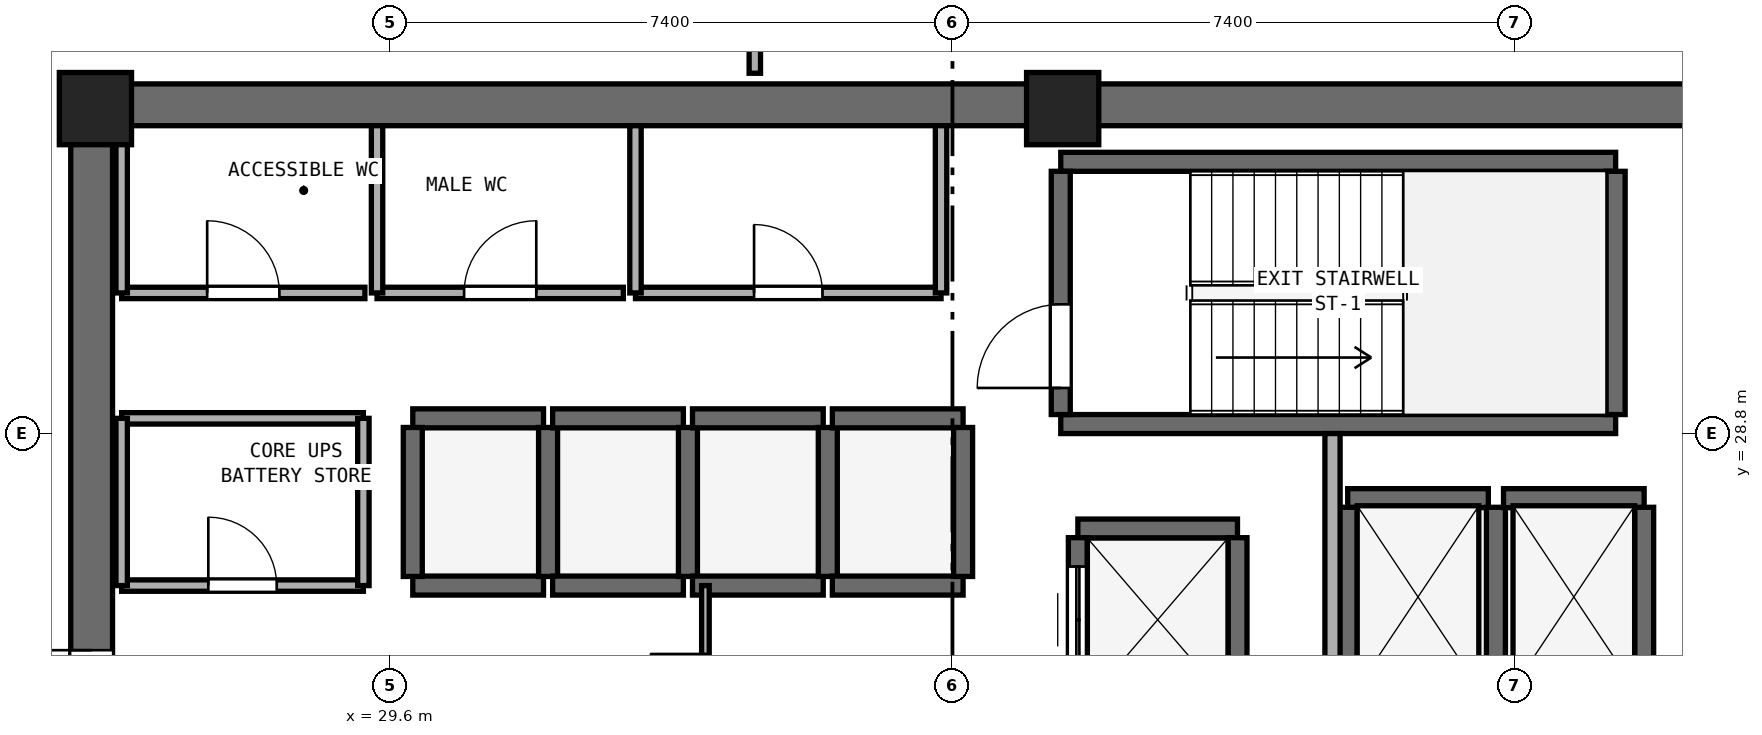
"""IFC4 building model, lengths in metres.
Left out: names, types, materials, properties, quantities, classifications, styles, units other than length and angle.
Written with IfcOpenShell. Run it as: python <this file> out.ifc"""

import sys

from ifc_helpers import new_model, si_unit, direction, frame, frame_2d, origin, origin_2d, place, context, subcontext, project, spatial, rectangle, extrude, element, fill, save


model = new_model("IFC4")
c1 = context("Model", 3, precision=1e-05, world=origin(), true_north=direction((0.0, 1.0)))
c2 = subcontext(c1, "Body", "Model", "MODEL_VIEW")
j1 = project(units=[si_unit("LENGTHUNIT", "METRE"), si_unit("PLANEANGLEUNIT", "RADIAN")], contexts=[c1])
p1 = place(None, origin())
s1 = spatial("IfcSite", under=j1, at=p1, CompositionType="ELEMENT")
p2 = place(p1, origin())
s2 = spatial("IfcBuilding", under=s1, at=p2, CompositionType="ELEMENT")
p3 = place(p2, frame((0.0, 0.0, 174.4)))
s3 = spatial("IfcBuildingStorey", under=s2, at=p3, CompositionType="ELEMENT", Elevation=174.4)
p4 = place(p3, frame((25.4, 33.125, 0.0), z_axis=(0.0, 0.0, 1.0), x_axis=(1.0, 0.0, 0.0)))
e1 = element("IfcWall", 1, at=p4, inside=s3, PredefinedType="SHEAR", context=c2, shape_type="SweptSolid", body=[
    extrude(rectangle(XDim=23.2, YDim=0.55, at=frame_2d((11.6, 0.0))), origin(), (0.0, 0.0, 1.0), 3.54),
])
p5 = place(p3, frame((25.675, 17.55, 0.0), z_axis=(0.0, 0.0, 1.0), x_axis=(0.0, 1.0, 0.0)))
e2 = element("IfcWall", 2, at=p5, inside=s3, PredefinedType="SHEAR", context=c2, shape_type="SweptSolid", body=[
    extrude(rectangle(XDim=15.3, YDim=0.55, at=frame_2d((7.65, 0.0))), origin(), (0.0, 0.0, 1.0), 3.54),
])
p6 = place(p5, frame((6.9, 0.0, 0.0)))
e3 = element("IfcOpeningElement", 3, at=p6, cuts=e2, PredefinedType="OPENING", context=c2, shape_type="SweptSolid", body=[
    extrude(rectangle(XDim=1.5, YDim=2.15, at=frame_2d((0.75, 1.075))), frame((0.0, 0.285, 0.0), z_axis=(0.0, -1.0, 0.0), x_axis=(1.0, 0.0, 0.0)), (0.0, 0.0, 1.0), 0.57),
])
for number, where, z_axis, x_axis in (
    (4, (38.45, 33.075, 0.0), (0.0, 0.0, 1.0), (1.0, 0.0, 0.0)),
    (5, (25.725, 33.075, 0.0), (0.0, 0.0, 1.0), (1.0, 0.0, 0.0)),
):
    element("IfcColumn", number, at=place(p3, frame(where, z_axis=z_axis, x_axis=x_axis)), inside=s3, PredefinedType="PILASTER", context=c2, shape_type="SweptSolid", body=[
        extrude(rectangle(XDim=0.95, YDim=0.95, at=origin_2d()), origin(), (0.0, 0.0, 1.0), 3.8),
    ])
for number, where, z_axis, x_axis in (
    (6, (38.425, 28.925, 0.0), (0.0, 0.0, 1.0), (1.0, 0.0, 0.0)),
    (7, (38.425, 32.375, 0.0), (0.0, 0.0, 1.0), (1.0, 0.0, 0.0)),
):
    element("IfcWall", number, at=place(p3, frame(where, z_axis=z_axis, x_axis=x_axis)), inside=s3, PredefinedType="SHEAR", context=c2, shape_type="SweptSolid", body=[
        extrude(rectangle(XDim=7.3, YDim=0.25, at=frame_2d((3.65, 0.0))), origin(), (0.0, 0.0, 1.0), 3.54),
    ])
p7 = place(p3, frame((38.425, 29.05, 0.0), z_axis=(0.0, 0.0, 1.0), x_axis=(0.0, 1.0, 0.0)))
e8 = element("IfcWall", 8, at=p7, inside=s3, PredefinedType="SHEAR", context=c2, shape_type="SweptSolid", body=[
    extrude(rectangle(XDim=3.2, YDim=0.25, at=frame_2d((1.6, 0.0))), origin(), (0.0, 0.0, 1.0), 3.54),
])
p8 = place(p7, frame((0.35, 0.0, 0.0)))
e9 = element("IfcOpeningElement", 9, at=p8, cuts=e8, PredefinedType="OPENING", context=c2, shape_type="SweptSolid", body=[
    extrude(rectangle(XDim=1.1, YDim=2.15, at=frame_2d((0.55, 1.075))), frame((0.0, 0.135, 0.0), z_axis=(0.0, -1.0, 0.0), x_axis=(1.0, 0.0, 0.0)), (0.0, 0.0, 1.0), 0.27),
])
p9 = place(p3, frame((45.725, 29.05, 0.0), z_axis=(0.0, 0.0, 1.0), x_axis=(0.0, 1.0, 0.0)))
e10 = element("IfcWall", 10, at=p9, inside=s3, PredefinedType="SHEAR", context=c2, shape_type="SweptSolid", body=[
    extrude(rectangle(XDim=3.2, YDim=0.25, at=frame_2d((1.6, 0.0))), origin(), (0.0, 0.0, 1.0), 3.54),
])
for number, where, z_axis, x_axis in (
    (11, (29.9, 26.8, 0.0), (0.0, 0.0, 1.0), (1.0, 0.0, 0.0)),
    (12, (29.9, 29.0, 0.0), (0.0, 0.0, 1.0), (1.0, 0.0, 0.0)),
):
    element("IfcWall", number, at=place(p3, frame(where, z_axis=z_axis, x_axis=x_axis)), inside=s3, PredefinedType="SHEAR", context=c2, shape_type="SweptSolid", body=[
        extrude(rectangle(XDim=1.72, YDim=0.25, at=frame_2d((0.86, 0.0))), origin(), (0.0, 0.0, 1.0), 3.54),
    ])
for number, where, z_axis, x_axis in (
    (13, (29.9, 26.92, 0.0), (0.0, 0.0, 1.0), (0.0, 1.0, 0.0)),
    (14, (31.68, 26.92, 0.0), (0.0, 0.0, 1.0), (0.0, 1.0, 0.0)),
):
    element("IfcWall", number, at=place(p3, frame(where, z_axis=z_axis, x_axis=x_axis)), inside=s3, PredefinedType="SHEAR", context=c2, shape_type="SweptSolid", body=[
        extrude(rectangle(XDim=1.96, YDim=0.25, at=frame_2d((0.98, 0.0))), origin(), (0.0, 0.0, 1.0), 3.54),
    ])
for number, where, z_axis, x_axis in (
    (15, (31.74, 26.8, 0.0), (0.0, 0.0, 1.0), (1.0, 0.0, 0.0)),
    (16, (31.74, 29.0, 0.0), (0.0, 0.0, 1.0), (1.0, 0.0, 0.0)),
):
    element("IfcWall", number, at=place(p3, frame(where, z_axis=z_axis, x_axis=x_axis)), inside=s3, PredefinedType="SHEAR", context=c2, shape_type="SweptSolid", body=[
        extrude(rectangle(XDim=1.72, YDim=0.25, at=frame_2d((0.86, 0.0))), origin(), (0.0, 0.0, 1.0), 3.54),
    ])
p10 = place(p3, frame((33.52, 26.92, 0.0), z_axis=(0.0, 0.0, 1.0), x_axis=(0.0, 1.0, 0.0)))
e17 = element("IfcWall", 17, at=p10, inside=s3, PredefinedType="SHEAR", context=c2, shape_type="SweptSolid", body=[
    extrude(rectangle(XDim=1.96, YDim=0.25, at=frame_2d((0.98, 0.0))), origin(), (0.0, 0.0, 1.0), 3.54),
])
for number, where, z_axis, x_axis in (
    (18, (33.58, 26.8, 0.0), (0.0, 0.0, 1.0), (1.0, 0.0, 0.0)),
    (19, (33.58, 29.0, 0.0), (0.0, 0.0, 1.0), (1.0, 0.0, 0.0)),
):
    element("IfcWall", number, at=place(p3, frame(where, z_axis=z_axis, x_axis=x_axis)), inside=s3, PredefinedType="SHEAR", context=c2, shape_type="SweptSolid", body=[
        extrude(rectangle(XDim=1.72, YDim=0.25, at=frame_2d((0.86, 0.0))), origin(), (0.0, 0.0, 1.0), 3.54),
    ])
p11 = place(p3, frame((35.36, 26.92, 0.0), z_axis=(0.0, 0.0, 1.0), x_axis=(0.0, 1.0, 0.0)))
e20 = element("IfcWall", 20, at=p11, inside=s3, PredefinedType="SHEAR", context=c2, shape_type="SweptSolid", body=[
    extrude(rectangle(XDim=1.96, YDim=0.25, at=frame_2d((0.98, 0.0))), origin(), (0.0, 0.0, 1.0), 3.54),
])
for number, where, z_axis, x_axis in (
    (21, (35.42, 26.8, 0.0), (0.0, 0.0, 1.0), (1.0, 0.0, 0.0)),
    (22, (35.42, 29.0, 0.0), (0.0, 0.0, 1.0), (1.0, 0.0, 0.0)),
):
    element("IfcWall", number, at=place(p3, frame(where, z_axis=z_axis, x_axis=x_axis)), inside=s3, PredefinedType="SHEAR", context=c2, shape_type="SweptSolid", body=[
        extrude(rectangle(XDim=1.72, YDim=0.25, at=frame_2d((0.86, 0.0))), origin(), (0.0, 0.0, 1.0), 3.54),
    ])
p12 = place(p3, frame((37.14, 26.92, 0.0), z_axis=(0.0, 0.0, 1.0), x_axis=(0.0, 1.0, 0.0)))
e23 = element("IfcWall", 23, at=p12, inside=s3, PredefinedType="SHEAR", context=c2, shape_type="SweptSolid", body=[
    extrude(rectangle(XDim=1.96, YDim=0.25, at=frame_2d((0.98, 0.0))), origin(), (0.0, 0.0, 1.0), 3.54),
])
p13 = place(p3, frame((42.2, 27.95, 0.0), z_axis=(0.0, 0.0, 1.0), x_axis=(1.0, 0.0, 0.0)))
e24 = element("IfcWall", 24, at=p13, inside=s3, PredefinedType="SHEAR", context=c2, shape_type="SweptSolid", body=[
    extrude(rectangle(XDim=1.85, YDim=0.25, at=frame_2d((0.925, 0.0))), origin(), (0.0, 0.0, 1.0), 3.54),
])
for number, where, z_axis, x_axis in (
    (25, (42.2, 25.47, 0.0), (0.0, 0.0, 1.0), (0.0, 1.0, 0.0)),
    (26, (44.15, 25.47, 0.0), (0.0, 0.0, 1.0), (0.0, 1.0, 0.0)),
):
    element("IfcWall", number, at=place(p3, frame(where, z_axis=z_axis, x_axis=x_axis)), inside=s3, PredefinedType="SHEAR", context=c2, shape_type="SweptSolid", body=[
        extrude(rectangle(XDim=2.36, YDim=0.25, at=frame_2d((1.18, 0.0))), origin(), (0.0, 0.0, 1.0), 3.54),
    ])
p14 = place(p3, frame((44.25, 27.95, 0.0), z_axis=(0.0, 0.0, 1.0), x_axis=(1.0, 0.0, 0.0)))
e27 = element("IfcWall", 27, at=p14, inside=s3, PredefinedType="SHEAR", context=c2, shape_type="SweptSolid", body=[
    extrude(rectangle(XDim=1.85, YDim=0.25, at=frame_2d((0.925, 0.0))), origin(), (0.0, 0.0, 1.0), 3.54),
])
p15 = place(p3, frame((46.1, 25.47, 0.0), z_axis=(0.0, 0.0, 1.0), x_axis=(0.0, 1.0, 0.0)))
e28 = element("IfcWall", 28, at=p15, inside=s3, PredefinedType="SHEAR", context=c2, shape_type="SweptSolid", body=[
    extrude(rectangle(XDim=2.36, YDim=0.25, at=frame_2d((1.18, 0.0))), origin(), (0.0, 0.0, 1.0), 3.54),
])
p16 = place(p3, frame((38.65, 27.55, 0.0), z_axis=(0.0, 0.0, 1.0), x_axis=(1.0, 0.0, 0.0)))
e29 = element("IfcWall", 29, at=p16, inside=s3, PredefinedType="SHEAR", context=c2, shape_type="SweptSolid", body=[
    extrude(rectangle(XDim=2.1, YDim=0.25, at=frame_2d((1.05, 0.0))), origin(), (0.0, 0.0, 1.0), 3.54),
])
p17 = place(p3, frame((38.65, 25.27, 0.0), z_axis=(0.0, 0.0, 1.0), x_axis=(0.0, 1.0, 0.0)))
e30 = element("IfcWall", 30, at=p17, inside=s3, PredefinedType="SHEAR", context=c2, shape_type="SweptSolid", body=[
    extrude(rectangle(XDim=2.16, YDim=0.25, at=frame_2d((1.08, 0.0))), origin(), (0.0, 0.0, 1.0), 3.54),
])
p18 = place(p17, frame((0.38, 0.0, 0.0)))
e31 = element("IfcOpeningElement", 31, at=p18, cuts=e30, PredefinedType="OPENING", context=c2, shape_type="SweptSolid", body=[
    extrude(rectangle(XDim=1.4, YDim=2.2, at=frame_2d((0.7, 1.1))), frame((0.0, 0.135, 0.0), z_axis=(0.0, -1.0, 0.0), x_axis=(1.0, 0.0, 0.0)), (0.0, 0.0, 1.0), 0.27),
])
p19 = place(p3, frame((40.75, 25.27, 0.0), z_axis=(0.0, 0.0, 1.0), x_axis=(0.0, 1.0, 0.0)))
e32 = element("IfcWall", 32, at=p19, inside=s3, PredefinedType="SHEAR", context=c2, shape_type="SweptSolid", body=[
    extrude(rectangle(XDim=2.16, YDim=0.25, at=frame_2d((1.08, 0.0))), origin(), (0.0, 0.0, 1.0), 3.54),
])
p20 = place(p3, frame((42.0, 22.75, 0.0), z_axis=(0.0, 0.0, 1.0), x_axis=(0.0, 1.0, 0.0)))
e33 = element("IfcWall", 33, at=p20, inside=s3, PredefinedType="SOLIDWALL", context=c2, shape_type="SweptSolid", body=[
    extrude(rectangle(XDim=6.05, YDim=0.2, at=frame_2d((3.025, 0.0))), origin(), (0.0, 0.0, 1.0), 3.54),
])
p21 = place(p20, frame((0.65, 0.0, 0.0)))
e34 = element("IfcOpeningElement", 34, at=p21, cuts=e33, PredefinedType="OPENING", context=c2, shape_type="SweptSolid", body=[
    extrude(rectangle(XDim=1.2, YDim=2.15, at=frame_2d((0.6, 1.075))), frame((0.0, 0.11, 0.0), z_axis=(0.0, -1.0, 0.0), x_axis=(1.0, 0.0, 0.0)), (0.0, 0.0, 1.0), 0.22),
])
p22 = place(p3, frame((26.07, 30.65, 0.0), z_axis=(0.0, 0.0, 1.0), x_axis=(1.0, 0.0, 0.0)))
e35 = element("IfcWall", 35, at=p22, inside=s3, PredefinedType="PARTITIONING", context=c2, shape_type="SweptSolid", body=[
    extrude(rectangle(XDim=3.2, YDim=0.15, at=frame_2d((1.6, 0.0))), origin(), (0.0, 0.0, 1.0), 3.54),
])
p23 = place(p22, frame((1.125, 0.0, 0.0)))
e36 = element("IfcOpeningElement", 36, at=p23, cuts=e35, PredefinedType="OPENING", context=c2, shape_type="SweptSolid", body=[
    extrude(rectangle(XDim=0.95, YDim=2.1, at=frame_2d((0.475, 1.05))), frame((0.0, 0.085, 0.0), z_axis=(0.0, -1.0, 0.0), x_axis=(1.0, 0.0, 0.0)), (0.0, 0.0, 1.0), 0.17),
])
p24 = place(p3, frame((26.07, 30.65, 0.0), z_axis=(0.0, 0.0, 1.0), x_axis=(0.0, 1.0, 0.0)))
e37 = element("IfcWall", 37, at=p24, inside=s3, PredefinedType="PARTITIONING", context=c2, shape_type="SweptSolid", body=[
    extrude(rectangle(XDim=2.2, YDim=0.15, at=frame_2d((1.1, 0.0))), origin(), (0.0, 0.0, 1.0), 2.64),
])
p25 = place(p3, frame((29.43, 30.65, 0.0), z_axis=(0.0, 0.0, 1.0), x_axis=(1.0, 0.0, 0.0)))
e38 = element("IfcWall", 38, at=p25, inside=s3, PredefinedType="PARTITIONING", context=c2, shape_type="SweptSolid", body=[
    extrude(rectangle(XDim=3.24, YDim=0.15, at=frame_2d((1.62, 0.0))), origin(), (0.0, 0.0, 1.0), 3.54),
])
p26 = place(p25, frame((1.145, 0.0, 0.0)))
e39 = element("IfcOpeningElement", 39, at=p26, cuts=e38, PredefinedType="OPENING", context=c2, shape_type="SweptSolid", body=[
    extrude(rectangle(XDim=0.95, YDim=2.1, at=frame_2d((0.475, 1.05))), frame((0.0, 0.085, 0.0), z_axis=(0.0, -1.0, 0.0), x_axis=(1.0, 0.0, 0.0)), (0.0, 0.0, 1.0), 0.17),
])
p27 = place(p3, frame((29.43, 30.65, 0.0), z_axis=(0.0, 0.0, 1.0), x_axis=(0.0, 1.0, 0.0)))
e40 = element("IfcWall", 40, at=p27, inside=s3, PredefinedType="PARTITIONING", context=c2, shape_type="SweptSolid", body=[
    extrude(rectangle(XDim=2.2, YDim=0.15, at=frame_2d((1.1, 0.0))), origin(), (0.0, 0.0, 1.0), 3.54),
])
p28 = place(p3, frame((32.83, 30.65, 0.0), z_axis=(0.0, 0.0, 1.0), x_axis=(1.0, 0.0, 0.0)))
e41 = element("IfcWall", 41, at=p28, inside=s3, PredefinedType="PARTITIONING", context=c2, shape_type="SweptSolid", body=[
    extrude(rectangle(XDim=4.02, YDim=0.15, at=frame_2d((2.01, 0.0))), origin(), (0.0, 0.0, 1.0), 3.54),
])
p29 = place(p28, frame((1.56, 0.0, 0.0)))
e42 = element("IfcOpeningElement", 42, at=p29, cuts=e41, PredefinedType="OPENING", context=c2, shape_type="SweptSolid", body=[
    extrude(rectangle(XDim=0.9, YDim=2.1, at=frame_2d((0.45, 1.05))), frame((0.0, 0.085, 0.0), z_axis=(0.0, -1.0, 0.0), x_axis=(1.0, 0.0, 0.0)), (0.0, 0.0, 1.0), 0.17),
])
for number, where, z_axis, x_axis in (
    (43, (32.83, 30.65, 0.0), (0.0, 0.0, 1.0), (0.0, 1.0, 0.0)),
    (44, (36.85, 30.65, 0.0), (0.0, 0.0, 1.0), (0.0, 1.0, 0.0)),
):
    element("IfcWall", number, at=place(p3, frame(where, z_axis=z_axis, x_axis=x_axis)), inside=s3, PredefinedType="PARTITIONING", context=c2, shape_type="SweptSolid", body=[
        extrude(rectangle(XDim=2.2, YDim=0.15, at=frame_2d((1.1, 0.0))), origin(), (0.0, 0.0, 1.0), 3.54),
    ])
p30 = place(p3, frame((26.07, 26.8, 0.0), z_axis=(0.0, 0.0, 1.0), x_axis=(1.0, 0.0, 0.0)))
e45 = element("IfcWall", 45, at=p30, inside=s3, PredefinedType="PARTITIONING", context=c2, shape_type="SweptSolid", body=[
    extrude(rectangle(XDim=3.18, YDim=0.15, at=frame_2d((1.59, 0.0))), origin(), (0.0, 0.0, 1.0), 3.54),
])
p31 = place(p30, frame((1.14, 0.0, 0.0)))
e46 = element("IfcOpeningElement", 46, at=p31, cuts=e45, PredefinedType="OPENING", context=c2, shape_type="SweptSolid", body=[
    extrude(rectangle(XDim=0.9, YDim=2.1, at=frame_2d((0.45, 1.05))), frame((0.0, 0.085, 0.0), z_axis=(0.0, -1.0, 0.0), x_axis=(1.0, 0.0, 0.0)), (0.0, 0.0, 1.0), 0.17),
])
p32 = place(p3, frame((26.07, 29.0, 0.0), z_axis=(0.0, 0.0, 1.0), x_axis=(1.0, 0.0, 0.0)))
e47 = element("IfcWall", 47, at=p32, inside=s3, PredefinedType="PARTITIONING", context=c2, shape_type="SweptSolid", body=[
    extrude(rectangle(XDim=3.18, YDim=0.15, at=frame_2d((1.59, 0.0))), origin(), (0.0, 0.0, 1.0), 3.54),
])
p33 = place(p3, frame((26.07, 26.8, 0.0), z_axis=(0.0, 0.0, 1.0), x_axis=(0.0, 1.0, 0.0)))
e48 = element("IfcWall", 48, at=p33, inside=s3, PredefinedType="PARTITIONING", context=c2, shape_type="SweptSolid", body=[
    extrude(rectangle(XDim=2.2, YDim=0.15, at=frame_2d((1.1, 0.0))), origin(), (0.0, 0.0, 1.0), 2.64),
])
p34 = place(p3, frame((29.25, 26.8, 0.0), z_axis=(0.0, 0.0, 1.0), x_axis=(0.0, 1.0, 0.0)))
e49 = element("IfcWall", 49, at=p34, inside=s3, PredefinedType="PARTITIONING", context=c2, shape_type="SweptSolid", body=[
    extrude(rectangle(XDim=2.2, YDim=0.15, at=frame_2d((1.1, 0.0))), origin(), (0.0, 0.0, 1.0), 3.54),
])
p35 = place(p3, frame((33.75, 23.6, 0.0), z_axis=(0.0, 0.0, 1.0), x_axis=(0.0, 1.0, 0.0)))
e50 = element("IfcWall", 50, at=p35, inside=s3, PredefinedType="PARTITIONING", context=c2, shape_type="SweptSolid", body=[
    extrude(rectangle(XDim=3.2, YDim=0.1, at=frame_2d((1.6, 0.0))), origin(), (0.0, 0.0, 1.0), 3.54),
])
p36 = place(p35, frame((0.85, 0.0, 0.0)))
e51 = element("IfcOpeningElement", 51, at=p36, cuts=e50, PredefinedType="OPENING", context=c2, shape_type="SweptSolid", body=[
    extrude(rectangle(XDim=1.45, YDim=2.12, at=frame_2d((0.725, 1.06))), frame((0.0, 0.06, 0.0), z_axis=(0.0, -1.0, 0.0), x_axis=(1.0, 0.0, 0.0)), (0.0, 0.0, 1.0), 0.12),
])
p37 = place(p3, frame((34.4, 33.54, 0.0), z_axis=(0.0, 0.0, 1.0), x_axis=(0.0, 1.0, 0.0)))
e52 = element("IfcWall", 52, at=p37, inside=s3, PredefinedType="PARTITIONING", context=c2, shape_type="SweptSolid", body=[
    extrude(rectangle(XDim=2.41, YDim=0.15, at=frame_2d((1.205, 0.0))), origin(), (0.0, 0.0, 1.0), 3.54),
])
p38 = place(p8, origin())
e53 = element("IfcDoor", 53, at=p38, inside=s3, OperationType="SINGLE_SWING_LEFT", PredefinedType="DOOR", context=c2, shape_type="SweptSolid", body=[
    extrude(rectangle(XDim=1.1, YDim=2.15, at=frame_2d((0.55, 1.075))), frame((0.0, 0.025, 0.0), z_axis=(0.0, -1.0, 0.0), x_axis=(1.0, 0.0, 0.0)), (0.0, 0.0, 1.0), 0.05),
])
fill(e9, e53)
p39 = place(p18, origin())
e54 = element("IfcDoor", 54, at=p39, inside=s3, OperationType="DOUBLE_DOOR_SLIDING", PredefinedType="DOOR", context=c2, shape_type="SweptSolid", body=[
    extrude(rectangle(XDim=1.4, YDim=2.2, at=frame_2d((0.7, 1.1))), frame((0.0, 0.025, 0.0), z_axis=(0.0, -1.0, 0.0), x_axis=(1.0, 0.0, 0.0)), (0.0, 0.0, 1.0), 0.05),
])
fill(e31, e54)
p40 = place(p6, origin())
e55 = element("IfcDoor", 55, at=p40, inside=s3, OperationType="DOUBLE_DOOR_SINGLE_SWING", PredefinedType="DOOR", context=c2, shape_type="SweptSolid", body=[
    extrude(rectangle(XDim=1.5, YDim=2.15, at=frame_2d((0.75, 1.075))), frame((0.0, 0.025, 0.0), z_axis=(0.0, -1.0, 0.0), x_axis=(1.0, 0.0, 0.0)), (0.0, 0.0, 1.0), 0.05),
])
fill(e3, e55)
p41 = place(p23, origin())
e56 = element("IfcDoor", 56, at=p41, inside=s3, OperationType="SINGLE_SWING_LEFT", PredefinedType="DOOR", context=c2, shape_type="SweptSolid", body=[
    extrude(rectangle(XDim=0.95, YDim=2.1, at=frame_2d((0.475, 1.05))), frame((0.0, 0.025, 0.0), z_axis=(0.0, -1.0, 0.0), x_axis=(1.0, 0.0, 0.0)), (0.0, 0.0, 1.0), 0.05),
])
fill(e36, e56)
p42 = place(p26, origin())
e57 = element("IfcDoor", 57, at=p42, inside=s3, OperationType="SINGLE_SWING_RIGHT", PredefinedType="DOOR", context=c2, shape_type="SweptSolid", body=[
    extrude(rectangle(XDim=0.95, YDim=2.1, at=frame_2d((0.475, 1.05))), frame((0.0, 0.025, 0.0), z_axis=(0.0, -1.0, 0.0), x_axis=(1.0, 0.0, 0.0)), (0.0, 0.0, 1.0), 0.05),
])
fill(e39, e57)
p43 = place(p29, origin())
e58 = element("IfcDoor", 58, at=p43, inside=s3, OperationType="SINGLE_SWING_LEFT", PredefinedType="DOOR", context=c2, shape_type="SweptSolid", body=[
    extrude(rectangle(XDim=0.9, YDim=2.1, at=frame_2d((0.45, 1.05))), frame((0.0, 0.025, 0.0), z_axis=(0.0, -1.0, 0.0), x_axis=(1.0, 0.0, 0.0)), (0.0, 0.0, 1.0), 0.05),
])
fill(e42, e58)
p44 = place(p31, origin())
e59 = element("IfcDoor", 59, at=p44, inside=s3, OperationType="SINGLE_SWING_LEFT", PredefinedType="DOOR", context=c2, shape_type="SweptSolid", body=[
    extrude(rectangle(XDim=0.9, YDim=2.1, at=frame_2d((0.45, 1.05))), frame((0.0, 0.025, 0.0), z_axis=(0.0, -1.0, 0.0), x_axis=(1.0, 0.0, 0.0)), (0.0, 0.0, 1.0), 0.05),
])
fill(e46, e59)
p45 = place(p36, origin())
e60 = element("IfcDoor", 60, at=p45, inside=s3, OperationType="DOUBLE_DOOR_SINGLE_SWING", PredefinedType="DOOR", context=c2, shape_type="SweptSolid", body=[
    extrude(rectangle(XDim=1.45, YDim=2.12, at=frame_2d((0.725, 1.06))), frame((0.0, 0.025, 0.0), z_axis=(0.0, -1.0, 0.0), x_axis=(1.0, 0.0, 0.0)), (0.0, 0.0, 1.0), 0.05),
])
fill(e51, e60)
save(model, sys.argv[1])
